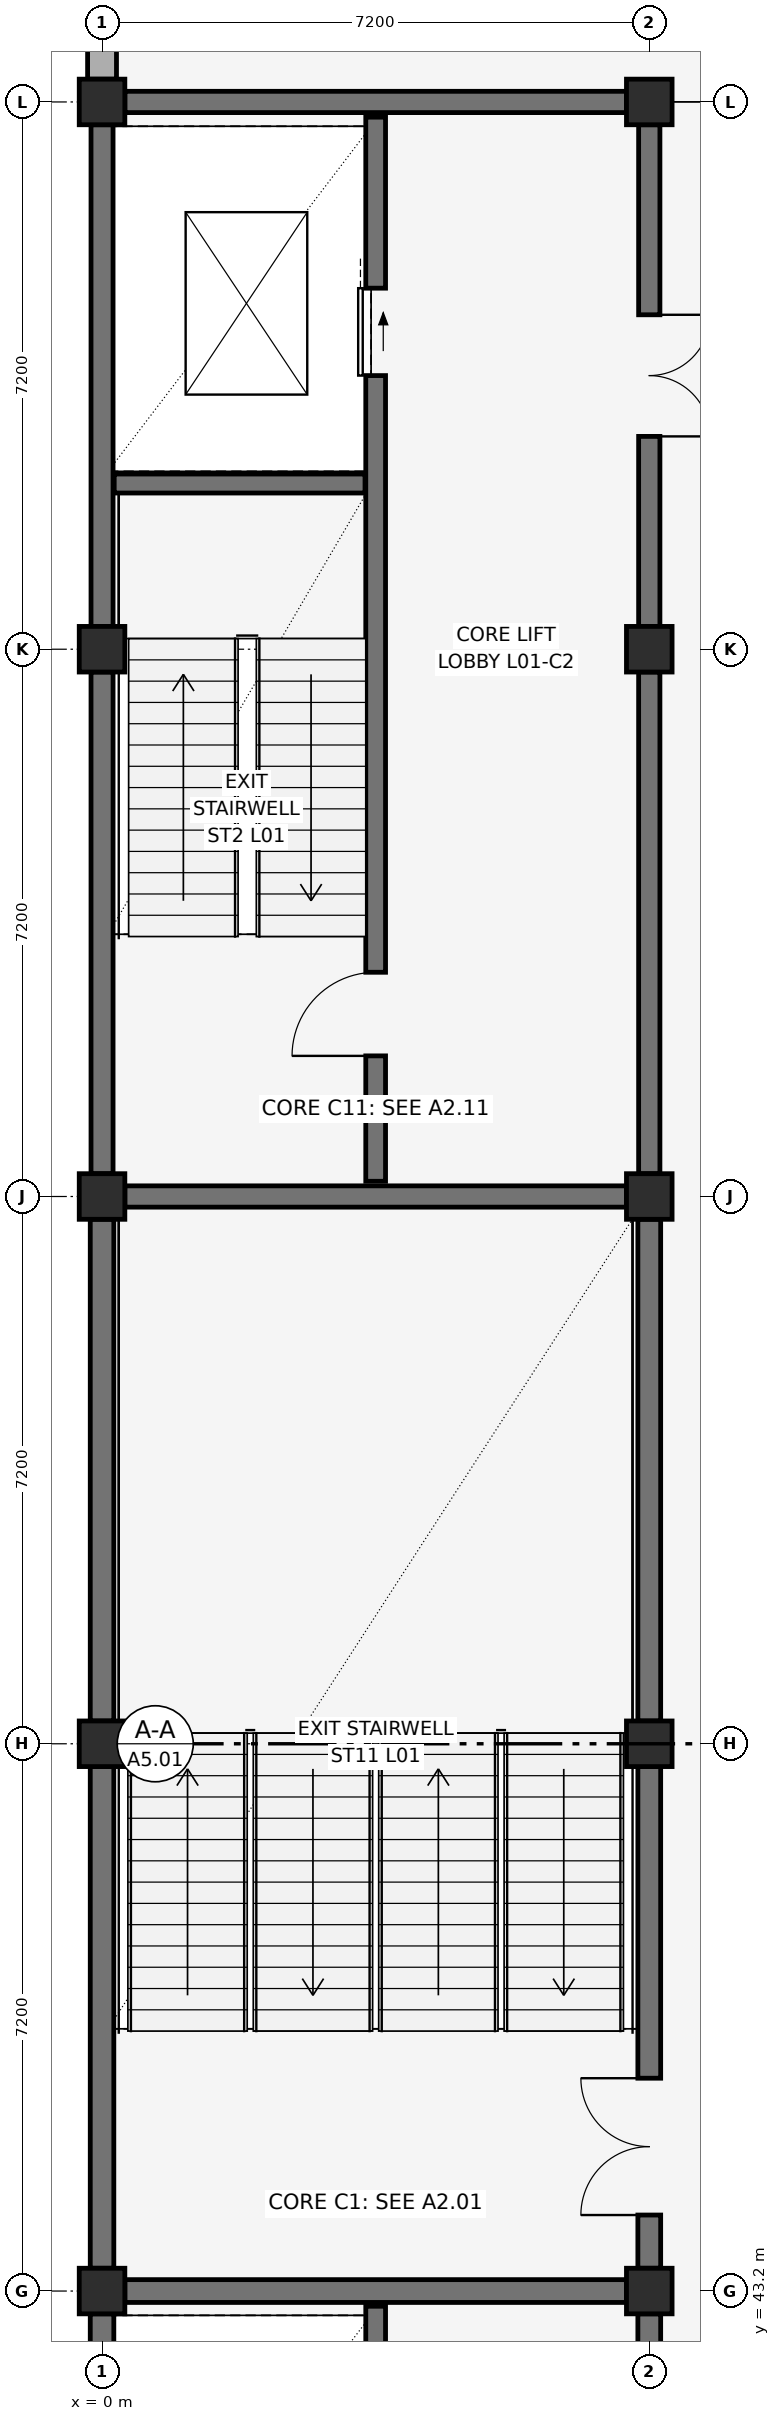
"""IFC4 building model, lengths in metres.
Left out: names, types, materials, properties, quantities, classifications, styles, units other than length and angle.
Written with IfcOpenShell. Run it as: python <this file> out.ifc"""

import sys

from ifc_helpers import new_model, si_unit, direction, frame, frame_2d, origin, origin_2d, place, context, subcontext, project, spatial, rectangle, extrude, element, fill, save


model = new_model("IFC4")
c1 = context("Model", 3, precision=1e-05, world=origin(), true_north=direction((0.0, 1.0)))
c2 = subcontext(c1, "Body", "Model", "MODEL_VIEW")
j1 = project(units=[si_unit("LENGTHUNIT", "METRE"), si_unit("PLANEANGLEUNIT", "RADIAN")], contexts=[c1])
p1 = place(None, origin())
s1 = spatial("IfcSite", under=j1, at=p1, CompositionType="ELEMENT")
p2 = place(p1, origin())
s2 = spatial("IfcBuilding", under=s1, at=p2, CompositionType="ELEMENT")
p3 = place(p2, frame((0.0, 0.0, 5.4)))
s3 = spatial("IfcBuildingStorey", under=s2, at=p3, CompositionType="ELEMENT", Elevation=5.4)
for number, where, z_axis, x_axis in (
    (1, (0.0, 43.2, 0.0), (0.0, 0.0, 1.0), (1.0, 0.0, 0.0)),
    (2, (0.0, 50.4, 0.0), (0.0, 0.0, 1.0), (1.0, 0.0, 0.0)),
    (3, (0.0, 57.6, 0.0), (0.0, 0.0, 1.0), (1.0, 0.0, 0.0)),
    (4, (0.0, 64.8, 0.0), (0.0, 0.0, 1.0), (1.0, 0.0, 0.0)),
    (5, (0.0, 72.0, 0.0), (0.0, 0.0, 1.0), (1.0, 0.0, 0.0)),
    (6, (7.2, 43.2, 0.0), (0.0, 0.0, 1.0), (1.0, 0.0, 0.0)),
    (7, (7.2, 50.4, 0.0), (0.0, 0.0, 1.0), (1.0, 0.0, 0.0)),
    (8, (7.2, 57.6, 0.0), (0.0, 0.0, 1.0), (1.0, 0.0, 0.0)),
    (9, (7.2, 64.8, 0.0), (0.0, 0.0, 1.0), (1.0, 0.0, 0.0)),
    (10, (7.2, 72.0, 0.0), (0.0, 0.0, 1.0), (1.0, 0.0, 0.0)),
):
    element("IfcColumn", number, at=place(p3, frame(where, z_axis=z_axis, x_axis=x_axis)), inside=s3, PredefinedType="COLUMN", context=c2, shape_type="SweptSolid", body=[
        extrude(rectangle(XDim=0.6, YDim=0.6, at=origin_2d()), origin(), (0.0, 0.0, 1.0), 4.8),
    ])
p4 = place(p3, frame((0.0, 72.3, 0.0), z_axis=(0.0, 0.0, 1.0), x_axis=(0.0, 1.0, 0.0)))
e11 = element("IfcWall", 11, at=p4, inside=s3, PredefinedType="SOLIDWALL", context=c2, shape_type="SweptSolid", body=[
    extrude(rectangle(XDim=6.6, YDim=0.38, at=frame_2d((3.3, 0.0))), origin(), (0.0, 0.0, 1.0), 4.19),
])
p5 = place(p4, frame((2.1, 0.0, 0.95)))
e12 = element("IfcOpeningElement", 12, at=p5, cuts=e11, PredefinedType="OPENING", context=c2, shape_type="SweptSolid", body=[
    extrude(rectangle(XDim=2.4, YDim=2.0, at=frame_2d((1.2, 1.0))), frame((0.0, 0.205, 0.0), z_axis=(0.0, -1.0, 0.0), x_axis=(1.0, 0.0, 0.0)), (0.0, 0.0, 1.0), 0.41),
])
p6 = place(p3, frame((0.3, 43.2, 0.0), z_axis=(0.0, 0.0, 1.0), x_axis=(1.0, 0.0, 0.0)))
e13 = element("IfcWall", 13, at=p6, inside=s3, PredefinedType="SHEAR", context=c2, shape_type="SweptSolid", body=[
    extrude(rectangle(XDim=6.6, YDim=0.3, at=frame_2d((3.3, 0.0))), origin(), (0.0, 0.0, 1.0), 4.54),
])
p7 = place(p3, frame((0.0, 36.3, 0.0), z_axis=(0.0, 0.0, 1.0), x_axis=(0.0, 1.0, 0.0)))
e14 = element("IfcWall", 14, at=p7, inside=s3, PredefinedType="SHEAR", context=c2, shape_type="SweptSolid", body=[
    extrude(rectangle(XDim=6.6, YDim=0.31, at=frame_2d((3.3, 0.0))), origin(), (0.0, 0.0, 1.0), 4.54),
])
p8 = place(p3, frame((7.2, 36.3, 0.0), z_axis=(0.0, 0.0, 1.0), x_axis=(0.0, 1.0, 0.0)))
e15 = element("IfcWall", 15, at=p8, inside=s3, PredefinedType="SHEAR", context=c2, shape_type="SweptSolid", body=[
    extrude(rectangle(XDim=6.6, YDim=0.3, at=frame_2d((3.3, 0.0))), origin(), (0.0, 0.0, 1.0), 4.54),
])
p9 = place(p8, frame((2.5, 0.0, 0.0)))
e16 = element("IfcOpeningElement", 16, at=p9, cuts=e15, PredefinedType="OPENING", context=c2, shape_type="SweptSolid", body=[
    extrude(rectangle(XDim=1.6, YDim=2.2, at=frame_2d((0.8, 1.1))), frame((0.0, 0.165, 0.0), z_axis=(0.0, -1.0, 0.0), x_axis=(1.0, 0.0, 0.0)), (0.0, 0.0, 1.0), 0.33),
])
p10 = place(p3, frame((3.6, 29.0, 0.0), z_axis=(0.0, 0.0, 1.0), x_axis=(0.0, 1.0, 0.0)))
e17 = element("IfcWall", 17, at=p10, inside=s3, PredefinedType="SHEAR", context=c2, shape_type="SweptSolid", body=[
    extrude(rectangle(XDim=14.0, YDim=0.26, at=frame_2d((7.0, 0.0))), origin(), (0.0, 0.0, 1.0), 4.54),
])
p11 = place(p10, frame((1.65, 0.0, 0.0)))
e18 = element("IfcOpeningElement", 18, at=p11, cuts=e17, PredefinedType="OPENING", context=c2, shape_type="SweptSolid", body=[
    extrude(rectangle(XDim=1.1, YDim=2.15, at=frame_2d((0.55, 1.075))), frame((0.0, 0.145, 0.0), z_axis=(0.0, -1.0, 0.0), x_axis=(1.0, 0.0, 0.0)), (0.0, 0.0, 1.0), 0.29),
])
p12 = place(p10, frame((10.6, 0.0, 0.0)))
e19 = element("IfcOpeningElement", 19, at=p12, cuts=e17, PredefinedType="OPENING", context=c2, shape_type="SweptSolid", body=[
    extrude(rectangle(XDim=1.1, YDim=2.2, at=frame_2d((0.55, 1.1))), frame((0.0, 0.145, 0.0), z_axis=(0.0, -1.0, 0.0), x_axis=(1.0, 0.0, 0.0)), (0.0, 0.0, 1.0), 0.29),
])
for number, where, z_axis, x_axis in (
    (20, (0.3, 57.6, 0.0), (0.0, 0.0, 1.0), (1.0, 0.0, 0.0)),
    (21, (0.3, 72.0, 0.0), (0.0, 0.0, 1.0), (1.0, 0.0, 0.0)),
):
    element("IfcWall", number, at=place(p3, frame(where, z_axis=z_axis, x_axis=x_axis)), inside=s3, PredefinedType="SHEAR", context=c2, shape_type="SweptSolid", body=[
        extrude(rectangle(XDim=6.6, YDim=0.28, at=frame_2d((3.3, 0.0))), origin(), (0.0, 0.0, 1.0), 4.54),
    ])
p13 = place(p3, frame((0.0, 57.9, 0.0), z_axis=(0.0, 0.0, 1.0), x_axis=(0.0, 1.0, 0.0)))
e22 = element("IfcWall", 22, at=p13, inside=s3, PredefinedType="SHEAR", context=c2, shape_type="SweptSolid", body=[
    extrude(rectangle(XDim=6.6, YDim=0.29, at=frame_2d((3.3, 0.0))), origin(), (0.0, 0.0, 1.0), 4.54),
])
p14 = place(p3, frame((0.0, 65.1, 0.0), z_axis=(0.0, 0.0, 1.0), x_axis=(0.0, 1.0, 0.0)))
e23 = element("IfcWall", 23, at=p14, inside=s3, PredefinedType="SHEAR", context=c2, shape_type="SweptSolid", body=[
    extrude(rectangle(XDim=6.6, YDim=0.29, at=frame_2d((3.3, 0.0))), origin(), (0.0, 0.0, 1.0), 4.54),
])
p15 = place(p3, frame((7.2, 57.9, 0.0), z_axis=(0.0, 0.0, 1.0), x_axis=(0.0, 1.0, 0.0)))
e24 = element("IfcWall", 24, at=p15, inside=s3, PredefinedType="SHEAR", context=c2, shape_type="SweptSolid", body=[
    extrude(rectangle(XDim=6.6, YDim=0.28, at=frame_2d((3.3, 0.0))), origin(), (0.0, 0.0, 1.0), 4.54),
])
p16 = place(p3, frame((7.2, 65.1, 0.0), z_axis=(0.0, 0.0, 1.0), x_axis=(0.0, 1.0, 0.0)))
e25 = element("IfcWall", 25, at=p16, inside=s3, PredefinedType="SHEAR", context=c2, shape_type="SweptSolid", body=[
    extrude(rectangle(XDim=6.6, YDim=0.28, at=frame_2d((3.3, 0.0))), origin(), (0.0, 0.0, 1.0), 4.54),
])
p17 = place(p16, frame((2.5, 0.0, 0.0)))
e26 = element("IfcOpeningElement", 26, at=p17, cuts=e25, PredefinedType="OPENING", context=c2, shape_type="SweptSolid", body=[
    extrude(rectangle(XDim=1.6, YDim=2.2, at=frame_2d((0.8, 1.1))), frame((0.0, 0.155, 0.0), z_axis=(0.0, -1.0, 0.0), x_axis=(1.0, 0.0, 0.0)), (0.0, 0.0, 1.0), 0.31),
])
p18 = place(p3, frame((3.6, 57.8, 0.0), z_axis=(0.0, 0.0, 1.0), x_axis=(0.0, 1.0, 0.0)))
e27 = element("IfcWall", 27, at=p18, inside=s3, PredefinedType="SHEAR", context=c2, shape_type="SweptSolid", body=[
    extrude(rectangle(XDim=14.0, YDim=0.26, at=frame_2d((7.0, 0.0))), origin(), (0.0, 0.0, 1.0), 4.54),
])
p19 = place(p18, frame((1.65, 0.0, 0.0)))
e28 = element("IfcOpeningElement", 28, at=p19, cuts=e27, PredefinedType="OPENING", context=c2, shape_type="SweptSolid", body=[
    extrude(rectangle(XDim=1.1, YDim=2.15, at=frame_2d((0.55, 1.075))), frame((0.0, 0.145, 0.0), z_axis=(0.0, -1.0, 0.0), x_axis=(1.0, 0.0, 0.0)), (0.0, 0.0, 1.0), 0.29),
])
p20 = place(p18, frame((10.6, 0.0, 0.0)))
e29 = element("IfcOpeningElement", 29, at=p20, cuts=e27, PredefinedType="OPENING", context=c2, shape_type="SweptSolid", body=[
    extrude(rectangle(XDim=1.15, YDim=2.2, at=frame_2d((0.575, 1.1))), frame((0.0, 0.145, 0.0), z_axis=(0.0, -1.0, 0.0), x_axis=(1.0, 0.0, 0.0)), (0.0, 0.0, 1.0), 0.29),
])
p21 = place(p3, frame((0.16, 66.98, 0.0), z_axis=(0.0, 0.0, 1.0), x_axis=(1.0, 0.0, 0.0)))
e30 = element("IfcWall", 30, at=p21, inside=s3, PredefinedType="SHEAR", context=c2, shape_type="SweptSolid", body=[
    extrude(rectangle(XDim=3.3, YDim=0.25, at=frame_2d((1.65, 0.0))), origin(), (0.0, 0.0, 1.0), 4.54),
])
for number, where, z_axis, x_axis in (
    (31, (0.0, 43.5, 0.0), (0.0, 0.0, 1.0), (0.0, 1.0, 0.0)),
    (32, (0.0, 50.7, 0.0), (0.0, 0.0, 1.0), (0.0, 1.0, 0.0)),
):
    element("IfcWall", number, at=place(p3, frame(where, z_axis=z_axis, x_axis=x_axis)), inside=s3, PredefinedType="SHEAR", context=c2, shape_type="SweptSolid", body=[
        extrude(rectangle(XDim=6.6, YDim=0.31, at=frame_2d((3.3, 0.0))), origin(), (0.0, 0.0, 1.0), 4.54),
    ])
p22 = place(p3, frame((7.2, 43.5, 0.0), z_axis=(0.0, 0.0, 1.0), x_axis=(0.0, 1.0, 0.0)))
e33 = element("IfcWall", 33, at=p22, inside=s3, PredefinedType="SHEAR", context=c2, shape_type="SweptSolid", body=[
    extrude(rectangle(XDim=6.6, YDim=0.3, at=frame_2d((3.3, 0.0))), origin(), (0.0, 0.0, 1.0), 4.54),
])
p23 = place(p22, frame((0.7, 0.0, 0.0)))
e34 = element("IfcOpeningElement", 34, at=p23, cuts=e33, PredefinedType="OPENING", context=c2, shape_type="SweptSolid", body=[
    extrude(rectangle(XDim=1.8, YDim=2.2, at=frame_2d((0.9, 1.1))), frame((0.0, 0.165, 0.0), z_axis=(0.0, -1.0, 0.0), x_axis=(1.0, 0.0, 0.0)), (0.0, 0.0, 1.0), 0.33),
])
p24 = place(p3, frame((7.2, 50.7, 0.0), z_axis=(0.0, 0.0, 1.0), x_axis=(0.0, 1.0, 0.0)))
e35 = element("IfcWall", 35, at=p24, inside=s3, PredefinedType="SHEAR", context=c2, shape_type="SweptSolid", body=[
    extrude(rectangle(XDim=6.6, YDim=0.3, at=frame_2d((3.3, 0.0))), origin(), (0.0, 0.0, 1.0), 4.54),
])
p25 = place(p19, origin())
e36 = element("IfcDoor", 36, at=p25, inside=s3, OperationType="SINGLE_SWING_LEFT", PredefinedType="DOOR", context=c2, shape_type="SweptSolid", body=[
    extrude(rectangle(XDim=1.1, YDim=2.15, at=frame_2d((0.55, 1.075))), frame((0.0, 0.025, 0.0), z_axis=(0.0, -1.0, 0.0), x_axis=(1.0, 0.0, 0.0)), (0.0, 0.0, 1.0), 0.05),
])
fill(e28, e36)
p26 = place(p20, frame((1.15, 0.0, 0.0), z_axis=(0.0, 0.0, 1.0), x_axis=(-1.0, 0.0, 0.0)))
e37 = element("IfcDoor", 37, at=p26, inside=s3, OperationType="SLIDING_TO_RIGHT", PredefinedType="DOOR", context=c2, shape_type="SweptSolid", body=[
    extrude(rectangle(XDim=1.15, YDim=2.2, at=frame_2d((0.575, 1.1))), frame((0.0, 0.025, 0.0), z_axis=(0.0, -1.0, 0.0), x_axis=(1.0, 0.0, 0.0)), (0.0, 0.0, 1.0), 0.05),
])
fill(e29, e37)
p27 = place(p17, frame((1.6, 0.0, 0.0), z_axis=(0.0, 0.0, 1.0), x_axis=(-1.0, 0.0, 0.0)))
e38 = element("IfcDoor", 38, at=p27, inside=s3, OperationType="DOUBLE_SWING_LEFT", PredefinedType="DOOR", context=c2, shape_type="SweptSolid", body=[
    extrude(rectangle(XDim=1.6, YDim=2.2, at=frame_2d((0.8, 1.1))), frame((0.0, 0.025, 0.0), z_axis=(0.0, -1.0, 0.0), x_axis=(1.0, 0.0, 0.0)), (0.0, 0.0, 1.0), 0.05),
])
fill(e26, e38)
p28 = place(p23, origin())
e39 = element("IfcDoor", 39, at=p28, inside=s3, OperationType="DOUBLE_SWING_LEFT", PredefinedType="DOOR", context=c2, shape_type="SweptSolid", body=[
    extrude(rectangle(XDim=1.8, YDim=2.2, at=frame_2d((0.9, 1.1))), frame((0.0, 0.025, 0.0), z_axis=(0.0, -1.0, 0.0), x_axis=(1.0, 0.0, 0.0)), (0.0, 0.0, 1.0), 0.05),
])
fill(e34, e39)
save(model, sys.argv[1])
